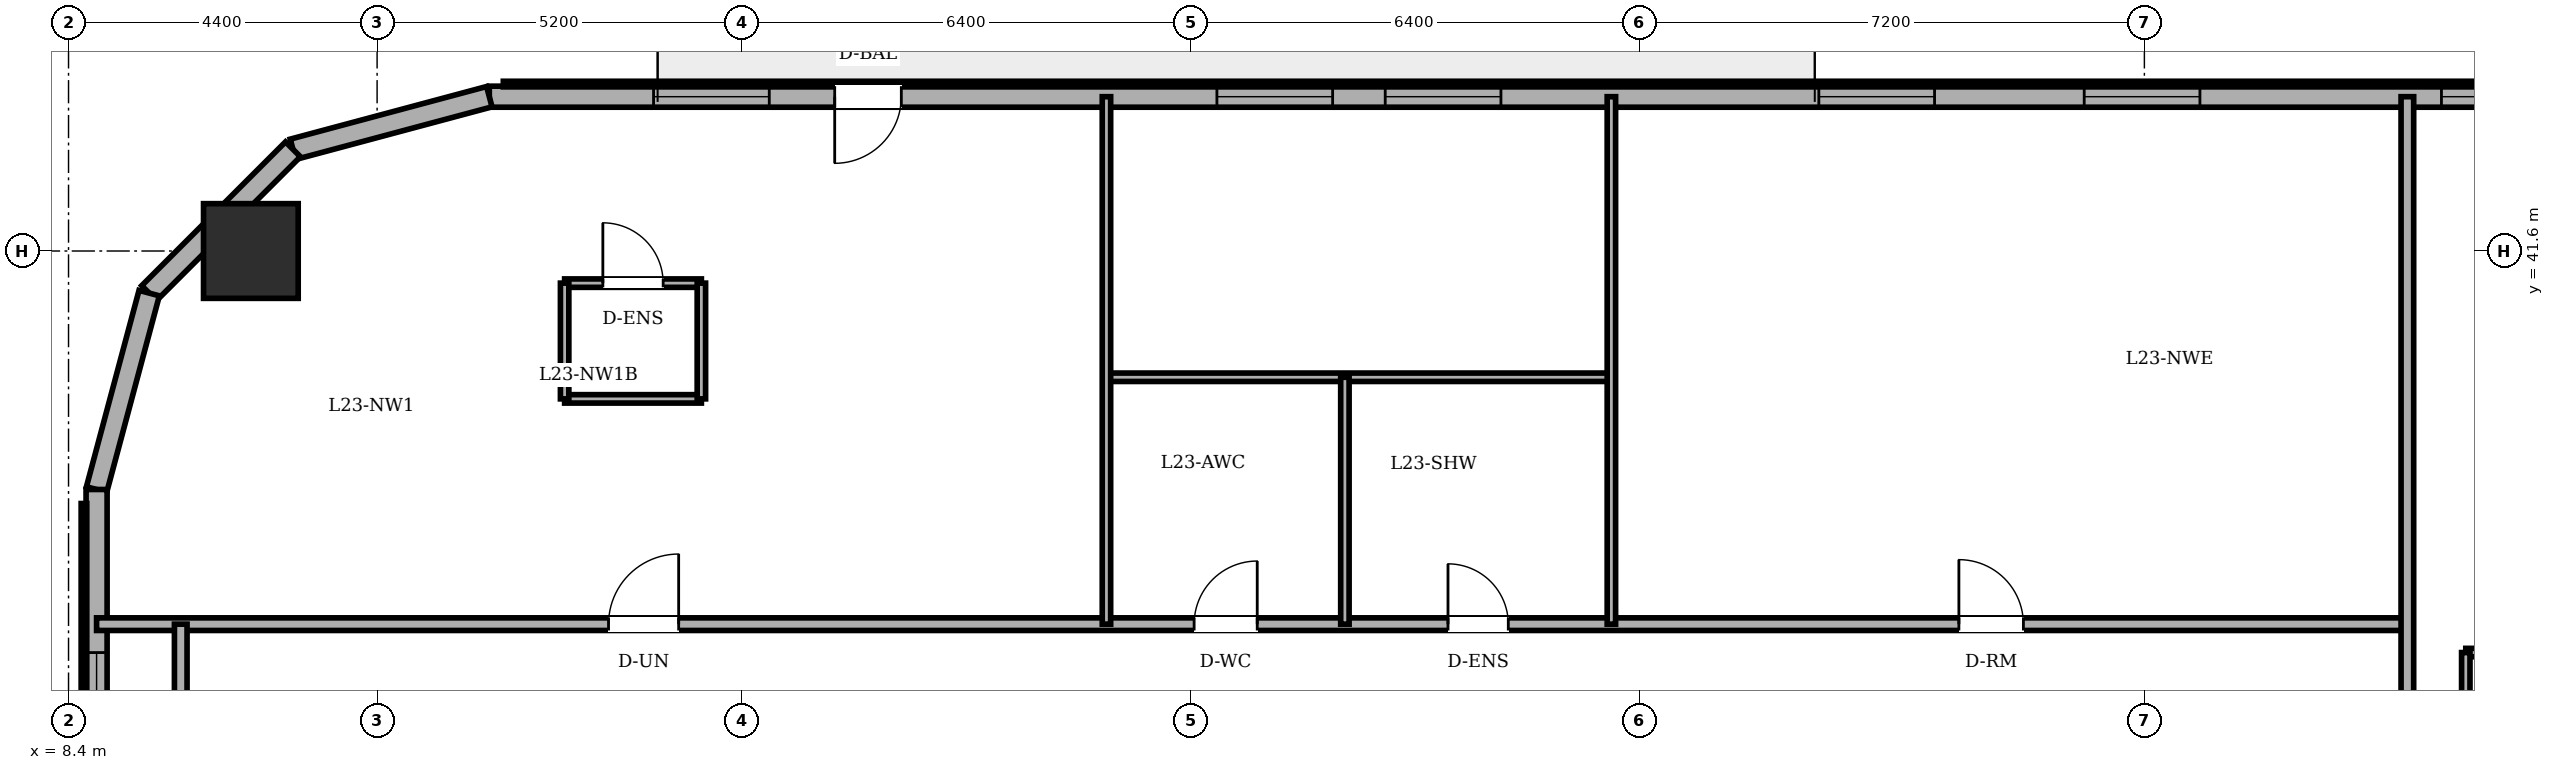
"""IFC4 building model, lengths in metres.
Left out: names, types, materials, properties, quantities, classifications, styles, units other than length and angle.
Written with IfcOpenShell. Run it as: python <this file> out.ifc"""

import sys

from ifc_helpers import new_model, si_unit, direction, frame, frame_2d, origin, origin_2d, place, context, subcontext, project, spatial, rectangle, circle, extrude, element, fill, save


model = new_model("IFC4")
c1 = context("Model", 3, precision=1e-05, world=origin(), true_north=direction((0.0, 1.0)))
c2 = subcontext(c1, "Body", "Model", "MODEL_VIEW")
j1 = project(units=[si_unit("LENGTHUNIT", "METRE"), si_unit("PLANEANGLEUNIT", "RADIAN")], contexts=[c1])
p1 = place(None, origin())
s1 = spatial("IfcSite", under=j1, at=p1, CompositionType="ELEMENT")
p2 = place(p1, origin())
s2 = spatial("IfcBuilding", under=s1, at=p2, CompositionType="ELEMENT")
p3 = place(p2, frame((0.0, 0.0, 89.9)))
s3 = spatial("IfcBuildingStorey", under=s2, at=p3, CompositionType="ELEMENT", Elevation=89.9)
p4 = place(p3, frame((11.0, 41.6, 0.0), z_axis=(0.0, 0.0, 1.0), x_axis=(1.0, 0.0, 0.0)))
e1 = element("IfcColumn", 1, at=p4, inside=s3, PredefinedType="COLUMN", context=c2, shape_type="SweptSolid", body=[
    extrude(circle(Radius=0.675, at=origin_2d()), origin(), (0.0, 0.0, 1.0), 3.6),
])
p5 = place(p3, frame((44.333, 43.8, 0.0), z_axis=(0.0, 0.0, 1.0), x_axis=(-1.0, 0.0, 0.0)))
e2 = element("IfcWall", 2, at=p5, inside=s3, PredefinedType="SOLIDWALL", context=c2, shape_type="SweptSolid", body=[
    extrude(rectangle(XDim=29.933, YDim=0.3, at=frame_2d((14.967, 0.0))), origin(), (0.0, 0.0, 1.0), 3.4),
])
p6 = place(p5, frame((24.058, 0.0, 0.0)))
e3 = element("IfcOpeningElement", 3, at=p6, cuts=e2, PredefinedType="OPENING", context=c2, shape_type="SweptSolid", body=[
    extrude(rectangle(XDim=0.95, YDim=2.2, at=frame_2d((0.475, 1.1))), frame((0.0, 0.16, 0.0), z_axis=(0.0, -1.0, 0.0), x_axis=(1.0, 0.0, 0.0)), (0.0, 0.0, 1.0), 0.32),
])
p7 = place(p5, frame((5.541, 0.0, 0.85)))
e4 = element("IfcOpeningElement", 4, at=p7, cuts=e2, PredefinedType="OPENING", context=c2, shape_type="SweptSolid", body=[
    extrude(rectangle(XDim=1.65, YDim=1.55, at=frame_2d((0.825, 0.775))), frame((0.0, 0.16, 0.0), z_axis=(0.0, -1.0, 0.0), x_axis=(1.0, 0.0, 0.0)), (0.0, 0.0, 1.0), 0.32),
])
p8 = place(p5, frame((9.325, 0.0, 0.85)))
e5 = element("IfcOpeningElement", 5, at=p8, cuts=e2, PredefinedType="OPENING", context=c2, shape_type="SweptSolid", body=[
    extrude(rectangle(XDim=1.65, YDim=1.55, at=frame_2d((0.825, 0.775))), frame((0.0, 0.16, 0.0), z_axis=(0.0, -1.0, 0.0), x_axis=(1.0, 0.0, 0.0)), (0.0, 0.0, 1.0), 0.32),
])
p9 = place(p5, frame((15.508, 0.0, 0.85)))
e6 = element("IfcOpeningElement", 6, at=p9, cuts=e2, PredefinedType="OPENING", context=c2, shape_type="SweptSolid", body=[
    extrude(rectangle(XDim=1.65, YDim=1.55, at=frame_2d((0.825, 0.775))), frame((0.0, 0.16, 0.0), z_axis=(0.0, -1.0, 0.0), x_axis=(1.0, 0.0, 0.0)), (0.0, 0.0, 1.0), 0.32),
])
p10 = place(p5, frame((17.908, 0.0, 0.85)))
e7 = element("IfcOpeningElement", 7, at=p10, cuts=e2, PredefinedType="OPENING", context=c2, shape_type="SweptSolid", body=[
    extrude(rectangle(XDim=1.65, YDim=1.55, at=frame_2d((0.825, 0.775))), frame((0.0, 0.16, 0.0), z_axis=(0.0, -1.0, 0.0), x_axis=(1.0, 0.0, 0.0)), (0.0, 0.0, 1.0), 0.32),
])
p11 = place(p5, frame((25.941, 0.0, 0.85)))
e8 = element("IfcOpeningElement", 8, at=p11, cuts=e2, PredefinedType="OPENING", context=c2, shape_type="SweptSolid", body=[
    extrude(rectangle(XDim=1.65, YDim=1.55, at=frame_2d((0.825, 0.775))), frame((0.0, 0.16, 0.0), z_axis=(0.0, -1.0, 0.0), x_axis=(1.0, 0.0, 0.0)), (0.0, 0.0, 1.0), 0.32),
])
p12 = place(p5, frame((1.047, 0.0, 0.85)))
e9 = element("IfcOpeningElement", 9, at=p12, cuts=e2, PredefinedType="OPENING", context=c2, shape_type="SweptSolid", body=[
    extrude(rectangle(XDim=1.05, YDim=1.55, at=frame_2d((0.525, 0.775))), frame((0.0, 0.16, 0.0), z_axis=(0.0, -1.0, 0.0), x_axis=(1.0, 0.0, 0.0)), (0.0, 0.0, 1.0), 0.32),
])
p13 = place(p3, frame((14.4, 43.8, 0.0), z_axis=(0.0, 0.0, 1.0), x_axis=(-0.965943540406, -0.258752926066, 0.0)))
e10 = element("IfcWall", 10, at=p13, inside=s3, PredefinedType="SOLIDWALL", context=c2, shape_type="SweptSolid", body=[
    extrude(rectangle(XDim=2.898, YDim=0.3, at=frame_2d((1.449, 0.0))), origin(), (0.0, 0.0, 1.0), 3.4),
])
p14 = place(p3, frame((11.6, 43.05, 0.0), z_axis=(0.0, 0.0, 1.0), x_axis=(-0.707106781187, -0.707106781187, 0.0)))
e11 = element("IfcWall", 11, at=p14, inside=s3, PredefinedType="SOLIDWALL", context=c2, shape_type="SweptSolid", body=[
    extrude(rectangle(XDim=2.899, YDim=0.3, at=frame_2d((1.45, 0.0))), origin(), (0.0, 0.0, 1.0), 3.4),
])
p15 = place(p3, frame((9.55, 41.0, 0.0), z_axis=(0.0, 0.0, 1.0), x_axis=(-0.258731875344, -0.96594917914, 0.0)))
e12 = element("IfcWall", 12, at=p15, inside=s3, PredefinedType="SOLIDWALL", context=c2, shape_type="SweptSolid", body=[
    extrude(rectangle(XDim=2.899, YDim=0.3, at=frame_2d((1.449, 0.0))), origin(), (0.0, 0.0, 1.0), 3.4),
])
p16 = place(p3, frame((8.8, 38.2, 0.0), z_axis=(0.0, 0.0, 1.0), x_axis=(0.0, -1.0, 0.0)))
e13 = element("IfcWall", 13, at=p16, inside=s3, PredefinedType="SOLIDWALL", context=c2, shape_type="SweptSolid", body=[
    extrude(rectangle(XDim=28.4, YDim=0.3, at=frame_2d((14.2, 0.0))), origin(), (0.0, 0.0, 1.0), 3.4),
])
p17 = place(p16, frame((2.325, 0.0, 0.85)))
e14 = element("IfcOpeningElement", 14, at=p17, cuts=e13, PredefinedType="OPENING", context=c2, shape_type="SweptSolid", body=[
    extrude(rectangle(XDim=1.65, YDim=1.55, at=frame_2d((0.825, 0.775))), frame((0.0, 0.16, 0.0), z_axis=(0.0, -1.0, 0.0), x_axis=(1.0, 0.0, 0.0)), (0.0, 0.0, 1.0), 0.32),
])
p18 = place(p16, frame((7.328, 0.0, 0.85)))
e15 = element("IfcOpeningElement", 15, at=p18, cuts=e13, PredefinedType="OPENING", context=c2, shape_type="SweptSolid", body=[
    extrude(rectangle(XDim=1.65, YDim=1.55, at=frame_2d((0.825, 0.775))), frame((0.0, 0.16, 0.0), z_axis=(0.0, -1.0, 0.0), x_axis=(1.0, 0.0, 0.0)), (0.0, 0.0, 1.0), 0.32),
])
p19 = place(p16, frame((11.102, 0.0, 0.85)))
e16 = element("IfcOpeningElement", 16, at=p19, cuts=e13, PredefinedType="OPENING", context=c2, shape_type="SweptSolid", body=[
    extrude(rectangle(XDim=1.65, YDim=1.55, at=frame_2d((0.825, 0.775))), frame((0.0, 0.16, 0.0), z_axis=(0.0, -1.0, 0.0), x_axis=(1.0, 0.0, 0.0)), (0.0, 0.0, 1.0), 0.32),
])
p20 = place(p16, frame((17.648, 0.0, 0.85)))
e17 = element("IfcOpeningElement", 17, at=p20, cuts=e13, PredefinedType="OPENING", context=c2, shape_type="SweptSolid", body=[
    extrude(rectangle(XDim=1.65, YDim=1.55, at=frame_2d((0.825, 0.775))), frame((0.0, 0.16, 0.0), z_axis=(0.0, -1.0, 0.0), x_axis=(1.0, 0.0, 0.0)), (0.0, 0.0, 1.0), 0.32),
])
p21 = place(p16, frame((20.422, 0.0, 0.85)))
e18 = element("IfcOpeningElement", 18, at=p21, cuts=e13, PredefinedType="OPENING", context=c2, shape_type="SweptSolid", body=[
    extrude(rectangle(XDim=1.65, YDim=1.55, at=frame_2d((0.825, 0.775))), frame((0.0, 0.16, 0.0), z_axis=(0.0, -1.0, 0.0), x_axis=(1.0, 0.0, 0.0)), (0.0, 0.0, 1.0), 0.32),
])
p22 = place(p16, frame((24.425, 0.0, 0.85)))
e19 = element("IfcOpeningElement", 19, at=p22, cuts=e13, PredefinedType="OPENING", context=c2, shape_type="SweptSolid", body=[
    extrude(rectangle(XDim=1.65, YDim=1.55, at=frame_2d((0.825, 0.775))), frame((0.0, 0.16, 0.0), z_axis=(0.0, -1.0, 0.0), x_axis=(1.0, 0.0, 0.0)), (0.0, 0.0, 1.0), 0.32),
])
p23 = place(p3, frame((42.583, 35.875, 0.0), z_axis=(0.0, 0.0, 1.0), x_axis=(1.0, 0.0, 0.0)))
e20 = element("IfcWall", 20, at=p23, inside=s3, PredefinedType="PARTITIONING", context=c2, shape_type="SweptSolid", body=[
    extrude(rectangle(XDim=1.95, YDim=0.12, at=frame_2d((0.975, 0.0))), origin(), (0.0, 0.0, 1.0), 3.4),
])
p24 = place(p23, frame((0.545, 0.0, 0.0)))
e21 = element("IfcOpeningElement", 21, at=p24, cuts=e20, PredefinedType="OPENING", context=c2, shape_type="SweptSolid", body=[
    extrude(rectangle(XDim=0.86, YDim=2.1, at=frame_2d((0.43, 1.05))), frame((0.0, 0.07, 0.0), z_axis=(0.0, -1.0, 0.0), x_axis=(1.0, 0.0, 0.0)), (0.0, 0.0, 1.0), 0.14),
])
p25 = place(p3, frame((42.583, 35.875, 0.0), z_axis=(0.0, 0.0, 1.0), x_axis=(0.0, -1.0, 0.0)))
e22 = element("IfcWall", 22, at=p25, inside=s3, PredefinedType="PARTITIONING", context=c2, shape_type="SweptSolid", body=[
    extrude(rectangle(XDim=1.65, YDim=0.12, at=frame_2d((0.825, 0.0))), origin(), (0.0, 0.0, 1.0), 3.4),
])
p26 = place(p3, frame((15.474, 41.142, 0.0), z_axis=(0.0, 0.0, 1.0), x_axis=(1.0, 0.0, 0.0)))
e23 = element("IfcWall", 23, at=p26, inside=s3, PredefinedType="PARTITIONING", context=c2, shape_type="SweptSolid", body=[
    extrude(rectangle(XDim=1.95, YDim=0.12, at=frame_2d((0.975, 0.0))), origin(), (0.0, 0.0, 1.0), 3.4),
])
p27 = place(p26, frame((0.545, 0.0, 0.0)))
e24 = element("IfcOpeningElement", 24, at=p27, cuts=e23, PredefinedType="OPENING", context=c2, shape_type="SweptSolid", body=[
    extrude(rectangle(XDim=0.86, YDim=2.1, at=frame_2d((0.43, 1.05))), frame((0.0, 0.07, 0.0), z_axis=(0.0, -1.0, 0.0), x_axis=(1.0, 0.0, 0.0)), (0.0, 0.0, 1.0), 0.14),
])
p28 = place(p3, frame((17.424, 39.492, 0.0), z_axis=(0.0, 0.0, 1.0), x_axis=(-1.0, 0.0, 0.0)))
e25 = element("IfcWall", 25, at=p28, inside=s3, PredefinedType="PARTITIONING", context=c2, shape_type="SweptSolid", body=[
    extrude(rectangle(XDim=1.95, YDim=0.12, at=frame_2d((0.975, 0.0))), origin(), (0.0, 0.0, 1.0), 3.4),
])
for number, where, z_axis, x_axis in (
    (26, (15.474, 41.142, 0.0), (0.0, 0.0, 1.0), (0.0, -1.0, 0.0)),
    (27, (17.424, 39.492, 0.0), (0.0, 0.0, 1.0), (0.0, 1.0, 0.0)),
):
    element("IfcWall", number, at=place(p3, frame(where, z_axis=z_axis, x_axis=x_axis)), inside=s3, PredefinedType="PARTITIONING", context=c2, shape_type="SweptSolid", body=[
        extrude(rectangle(XDim=1.65, YDim=0.12, at=frame_2d((0.825, 0.0))), origin(), (0.0, 0.0, 1.0), 3.4),
    ])
p29 = place(p3, frame((8.8, 36.28, 0.0), z_axis=(0.0, 0.0, 1.0), x_axis=(1.0, 0.0, 0.0)))
e28 = element("IfcWall", 28, at=p29, inside=s3, PredefinedType="PARTITIONING", context=c2, shape_type="SweptSolid", body=[
    extrude(rectangle(XDim=32.95, YDim=0.18, at=frame_2d((16.475, 0.0))), origin(), (0.0, 0.0, 1.0), 3.4),
])
p30 = place(p29, frame((15.65, 0.0, 0.0)))
e29 = element("IfcOpeningElement", 29, at=p30, cuts=e28, PredefinedType="OPENING", context=c2, shape_type="SweptSolid", body=[
    extrude(rectangle(XDim=0.9, YDim=2.1, at=frame_2d((0.45, 1.05))), frame((0.0, 0.1, 0.0), z_axis=(0.0, -1.0, 0.0), x_axis=(1.0, 0.0, 0.0)), (0.0, 0.0, 1.0), 0.2),
])
p31 = place(p29, frame((19.27, 0.0, 0.0)))
e30 = element("IfcOpeningElement", 30, at=p31, cuts=e28, PredefinedType="OPENING", context=c2, shape_type="SweptSolid", body=[
    extrude(rectangle(XDim=0.86, YDim=2.1, at=frame_2d((0.43, 1.05))), frame((0.0, 0.1, 0.0), z_axis=(0.0, -1.0, 0.0), x_axis=(1.0, 0.0, 0.0)), (0.0, 0.0, 1.0), 0.2),
])
p32 = place(p29, frame((7.3, 0.0, 0.0)))
e31 = element("IfcOpeningElement", 31, at=p32, cuts=e28, PredefinedType="OPENING", context=c2, shape_type="SweptSolid", body=[
    extrude(rectangle(XDim=1.0, YDim=2.15, at=frame_2d((0.5, 1.075))), frame((0.0, 0.1, 0.0), z_axis=(0.0, -1.0, 0.0), x_axis=(1.0, 0.0, 0.0)), (0.0, 0.0, 1.0), 0.2),
])
p33 = place(p29, frame((26.555, 0.0, 0.0)))
e32 = element("IfcOpeningElement", 32, at=p33, cuts=e28, PredefinedType="OPENING", context=c2, shape_type="SweptSolid", body=[
    extrude(rectangle(XDim=0.92, YDim=2.1, at=frame_2d((0.46, 1.05))), frame((0.0, 0.1, 0.0), z_axis=(0.0, -1.0, 0.0), x_axis=(1.0, 0.0, 0.0)), (0.0, 0.0, 1.0), 0.2),
])
p34 = place(p3, frame((23.2, 39.8, 0.0), z_axis=(0.0, 0.0, 1.0), x_axis=(1.0, 0.0, 0.0)))
e33 = element("IfcWall", 33, at=p34, inside=s3, PredefinedType="PARTITIONING", context=c2, shape_type="SweptSolid", body=[
    extrude(rectangle(XDim=7.2, YDim=0.12, at=frame_2d((3.6, 0.0))), origin(), (0.0, 0.0, 1.0), 3.4),
])
p35 = place(p3, frame((10.0, 33.82, 0.0), z_axis=(0.0, 0.0, 1.0), x_axis=(0.0, 1.0, 0.0)))
e34 = element("IfcWall", 34, at=p35, inside=s3, PredefinedType="PARTITIONING", context=c2, shape_type="SweptSolid", body=[
    extrude(rectangle(XDim=2.46, YDim=0.18, at=frame_2d((1.23, 0.0))), origin(), (0.0, 0.0, 1.0), 3.4),
])
p36 = place(p3, frame((23.2, 36.28, 0.0), z_axis=(0.0, 0.0, 1.0), x_axis=(0.0, 1.0, 0.0)))
e35 = element("IfcWall", 35, at=p36, inside=s3, PredefinedType="PARTITIONING", context=c2, shape_type="SweptSolid", body=[
    extrude(rectangle(XDim=7.52, YDim=0.12, at=frame_2d((3.76, 0.0))), origin(), (0.0, 0.0, 1.0), 3.4),
])
p37 = place(p3, frame((26.6, 36.28, 0.0), z_axis=(0.0, 0.0, 1.0), x_axis=(0.0, 1.0, 0.0)))
e36 = element("IfcWall", 36, at=p37, inside=s3, PredefinedType="PARTITIONING", context=c2, shape_type="SweptSolid", body=[
    extrude(rectangle(XDim=3.52, YDim=0.12, at=frame_2d((1.76, 0.0))), origin(), (0.0, 0.0, 1.0), 3.4),
])
p38 = place(p3, frame((30.4, 36.28, 0.0), z_axis=(0.0, 0.0, 1.0), x_axis=(0.0, 1.0, 0.0)))
e37 = element("IfcWall", 37, at=p38, inside=s3, PredefinedType="PARTITIONING", context=c2, shape_type="SweptSolid", body=[
    extrude(rectangle(XDim=7.52, YDim=0.12, at=frame_2d((3.76, 0.0))), origin(), (0.0, 0.0, 1.0), 3.4),
])
p39 = place(p3, frame((41.75, 25.18, 0.0), z_axis=(0.0, 0.0, 1.0), x_axis=(0.0, 1.0, 0.0)))
e38 = element("IfcWall", 38, at=p39, inside=s3, PredefinedType="PARTITIONING", context=c2, shape_type="SweptSolid", body=[
    extrude(rectangle(XDim=18.62, YDim=0.18, at=frame_2d((9.31, 0.0))), origin(), (0.0, 0.0, 1.0), 3.4),
])
p40 = place(p39, frame((5.31, 0.0, 0.0)))
e39 = element("IfcOpeningElement", 39, at=p40, cuts=e38, PredefinedType="OPENING", context=c2, shape_type="SweptSolid", body=[
    extrude(rectangle(XDim=1.0, YDim=2.15, at=frame_2d((0.5, 1.075))), frame((0.0, 0.1, 0.0), z_axis=(0.0, -1.0, 0.0), x_axis=(1.0, 0.0, 0.0)), (0.0, 0.0, 1.0), 0.2),
])
p41 = place(p6, origin())
e40 = element("IfcDoor", 40, at=p41, inside=s3, OperationType="SINGLE_SWING_RIGHT", PredefinedType="DOOR", context=c2, shape_type="SweptSolid", body=[
    extrude(rectangle(XDim=0.95, YDim=2.2, at=frame_2d((0.475, 1.1))), frame((0.0, 0.025, 0.0), z_axis=(0.0, -1.0, 0.0), x_axis=(1.0, 0.0, 0.0)), (0.0, 0.0, 1.0), 0.05),
])
fill(e3, e40)
p42 = place(p7, origin())
e41 = element("IfcWindow", 41, at=p42, inside=s3, PartitioningType="DOUBLE_PANEL_VERTICAL", PredefinedType="WINDOW", context=c2, shape_type="SweptSolid", body=[
    extrude(rectangle(XDim=1.65, YDim=1.55, at=frame_2d((0.825, 0.775))), frame((0.0, 0.03, 0.0), z_axis=(0.0, -1.0, 0.0), x_axis=(1.0, 0.0, 0.0)), (0.0, 0.0, 1.0), 0.06),
])
fill(e4, e41)
p43 = place(p8, origin())
e42 = element("IfcWindow", 42, at=p43, inside=s3, PartitioningType="DOUBLE_PANEL_VERTICAL", PredefinedType="WINDOW", context=c2, shape_type="SweptSolid", body=[
    extrude(rectangle(XDim=1.65, YDim=1.55, at=frame_2d((0.825, 0.775))), frame((0.0, 0.03, 0.0), z_axis=(0.0, -1.0, 0.0), x_axis=(1.0, 0.0, 0.0)), (0.0, 0.0, 1.0), 0.06),
])
fill(e5, e42)
p44 = place(p9, origin())
e43 = element("IfcWindow", 43, at=p44, inside=s3, PartitioningType="DOUBLE_PANEL_VERTICAL", PredefinedType="WINDOW", context=c2, shape_type="SweptSolid", body=[
    extrude(rectangle(XDim=1.65, YDim=1.55, at=frame_2d((0.825, 0.775))), frame((0.0, 0.03, 0.0), z_axis=(0.0, -1.0, 0.0), x_axis=(1.0, 0.0, 0.0)), (0.0, 0.0, 1.0), 0.06),
])
fill(e6, e43)
p45 = place(p10, origin())
e44 = element("IfcWindow", 44, at=p45, inside=s3, PartitioningType="DOUBLE_PANEL_VERTICAL", PredefinedType="WINDOW", context=c2, shape_type="SweptSolid", body=[
    extrude(rectangle(XDim=1.65, YDim=1.55, at=frame_2d((0.825, 0.775))), frame((0.0, 0.03, 0.0), z_axis=(0.0, -1.0, 0.0), x_axis=(1.0, 0.0, 0.0)), (0.0, 0.0, 1.0), 0.06),
])
fill(e7, e44)
p46 = place(p11, origin())
e45 = element("IfcWindow", 45, at=p46, inside=s3, PartitioningType="DOUBLE_PANEL_VERTICAL", PredefinedType="WINDOW", context=c2, shape_type="SweptSolid", body=[
    extrude(rectangle(XDim=1.65, YDim=1.55, at=frame_2d((0.825, 0.775))), frame((0.0, 0.03, 0.0), z_axis=(0.0, -1.0, 0.0), x_axis=(1.0, 0.0, 0.0)), (0.0, 0.0, 1.0), 0.06),
])
fill(e8, e45)
p47 = place(p17, origin())
e46 = element("IfcWindow", 46, at=p47, inside=s3, PartitioningType="DOUBLE_PANEL_VERTICAL", PredefinedType="WINDOW", context=c2, shape_type="SweptSolid", body=[
    extrude(rectangle(XDim=1.65, YDim=1.55, at=frame_2d((0.825, 0.775))), frame((0.0, 0.03, 0.0), z_axis=(0.0, -1.0, 0.0), x_axis=(1.0, 0.0, 0.0)), (0.0, 0.0, 1.0), 0.06),
])
fill(e14, e46)
p48 = place(p12, origin())
e47 = element("IfcWindow", 47, at=p48, inside=s3, PartitioningType="SINGLE_PANEL", PredefinedType="WINDOW", context=c2, shape_type="SweptSolid", body=[
    extrude(rectangle(XDim=1.05, YDim=1.55, at=frame_2d((0.525, 0.775))), frame((0.0, 0.03, 0.0), z_axis=(0.0, -1.0, 0.0), x_axis=(1.0, 0.0, 0.0)), (0.0, 0.0, 1.0), 0.06),
])
fill(e9, e47)
p49 = place(p27, origin())
e48 = element("IfcDoor", 48, at=p49, inside=s3, OperationType="SINGLE_SWING_LEFT", PredefinedType="DOOR", context=c2, shape_type="SweptSolid", body=[
    extrude(rectangle(XDim=0.86, YDim=2.1, at=frame_2d((0.43, 1.05))), frame((0.0, 0.025, 0.0), z_axis=(0.0, -1.0, 0.0), x_axis=(1.0, 0.0, 0.0)), (0.0, 0.0, 1.0), 0.05),
])
fill(e24, e48)
p50 = place(p30, origin())
e49 = element("IfcDoor", 49, at=p50, inside=s3, OperationType="SINGLE_SWING_RIGHT", PredefinedType="DOOR", context=c2, shape_type="SweptSolid", body=[
    extrude(rectangle(XDim=0.9, YDim=2.1, at=frame_2d((0.45, 1.05))), frame((0.0, 0.025, 0.0), z_axis=(0.0, -1.0, 0.0), x_axis=(1.0, 0.0, 0.0)), (0.0, 0.0, 1.0), 0.05),
])
fill(e29, e49)
p51 = place(p31, origin())
e50 = element("IfcDoor", 50, at=p51, inside=s3, OperationType="SINGLE_SWING_LEFT", PredefinedType="DOOR", context=c2, shape_type="SweptSolid", body=[
    extrude(rectangle(XDim=0.86, YDim=2.1, at=frame_2d((0.43, 1.05))), frame((0.0, 0.025, 0.0), z_axis=(0.0, -1.0, 0.0), x_axis=(1.0, 0.0, 0.0)), (0.0, 0.0, 1.0), 0.05),
])
fill(e30, e50)
p52 = place(p32, origin())
e51 = element("IfcDoor", 51, at=p52, inside=s3, OperationType="SINGLE_SWING_RIGHT", PredefinedType="DOOR", context=c2, shape_type="SweptSolid", body=[
    extrude(rectangle(XDim=1.0, YDim=2.15, at=frame_2d((0.5, 1.075))), frame((0.0, 0.025, 0.0), z_axis=(0.0, -1.0, 0.0), x_axis=(1.0, 0.0, 0.0)), (0.0, 0.0, 1.0), 0.05),
])
fill(e31, e51)
p53 = place(p33, origin())
e52 = element("IfcDoor", 52, at=p53, inside=s3, OperationType="SINGLE_SWING_LEFT", PredefinedType="DOOR", context=c2, shape_type="SweptSolid", body=[
    extrude(rectangle(XDim=0.92, YDim=2.1, at=frame_2d((0.46, 1.05))), frame((0.0, 0.025, 0.0), z_axis=(0.0, -1.0, 0.0), x_axis=(1.0, 0.0, 0.0)), (0.0, 0.0, 1.0), 0.05),
])
fill(e32, e52)
save(model, sys.argv[1])
